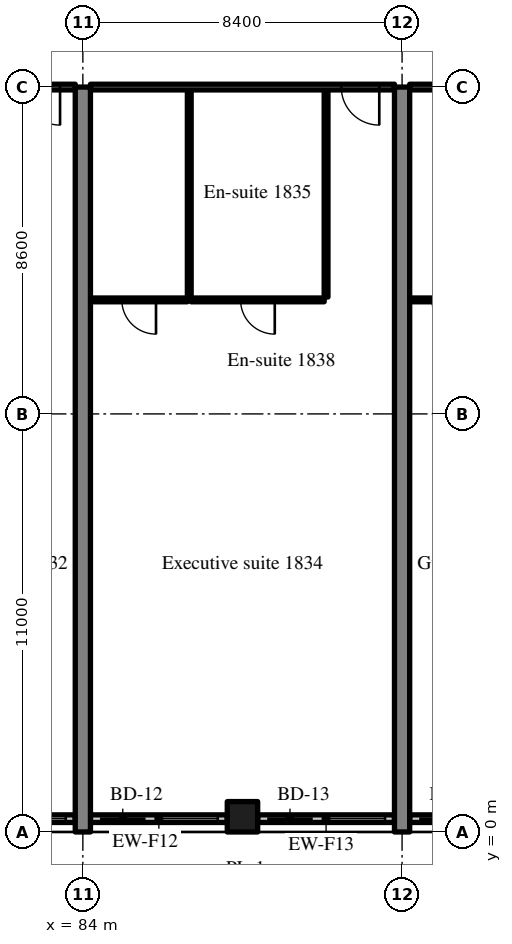
"""IFC4 building model, lengths in metres.
Left out: names, types, materials, properties, quantities, classifications, styles, units other than length and angle.
Written with IfcOpenShell. Run it as: python <this file> out.ifc"""

import sys

from ifc_helpers import new_model, si_unit, direction, frame, frame_2d, origin, origin_2d, place, context, subcontext, project, spatial, rectangle, extrude, source, transform, mapped, element, fill, save


model = new_model("IFC4")
c1 = context("Model", 3, precision=1e-05, world=origin(), true_north=direction((0.0, 1.0)))
c2 = subcontext(c1, "Body", "Model", "MODEL_VIEW")
j1 = project(units=[si_unit("LENGTHUNIT", "METRE"), si_unit("PLANEANGLEUNIT", "RADIAN")], contexts=[c1])
p1 = place(None, origin())
s1 = spatial("IfcSite", under=j1, at=p1, CompositionType="ELEMENT")
p2 = place(p1, origin())
s2 = spatial("IfcBuilding", under=s1, at=p2, CompositionType="ELEMENT")
p3 = place(p2, frame((0.0, 0.0, 77.2)))
s3 = spatial("IfcBuildingStorey", under=s2, at=p3, CompositionType="ELEMENT", Elevation=77.2)
m1 = source(origin(), c2, "Body", "SweptSolid", [
    extrude(rectangle(XDim=19.6, YDim=0.4, at=frame_2d((9.8, 0.0))), origin(), (0.0, 0.0, 1.0), 3.52),
])
for number, where, z_axis, x_axis in (
    (1, (84.0, 0.0, 0.0), (0.0, 0.0, 1.0), (0.0, 1.0, 0.0)),
    (2, (92.4, 0.0, 0.0), (0.0, 0.0, 1.0), (0.0, 1.0, 0.0)),
):
    element("IfcWall", number, at=place(p3, frame(where, z_axis=z_axis, x_axis=x_axis)), inside=s3, PredefinedType="SHEAR", context=c2, shape_type="MappedRepresentation", body=[
        mapped(m1, transform((0.0, 0.0, 0.0), scale=1.0)),
    ])
m2 = source(origin(), c2, "Body", "SweptSolid", [
    extrude(rectangle(XDim=0.8, YDim=0.8, at=origin_2d()), origin(), (0.0, 0.0, 1.0), 3.52),
])
p4 = place(p3, frame((88.2, 0.4, 0.0), z_axis=(0.0, 0.0, 1.0), x_axis=(1.0, 0.0, 0.0)))
e3 = element("IfcColumn", 3, at=p4, inside=s3, PredefinedType="COLUMN", context=c2, shape_type="MappedRepresentation", body=[
    mapped(m2, transform((0.0, 0.0, 0.0), scale=1.0)),
])
m3 = source(origin(), c2, "Body", "SweptSolid", [
    extrude(rectangle(XDim=3.6, YDim=0.2, at=frame_2d((1.8, 0.0))), origin(), (0.0, 0.0, 1.0), 2.82),
])
p5 = place(p3, frame((80.2, 0.35, 0.0), z_axis=(0.0, 0.0, 1.0), x_axis=(1.0, 0.0, 0.0)))
e4 = element("IfcWall", 4, at=p5, inside=s3, PredefinedType="SOLIDWALL", context=c2, shape_type="MappedRepresentation", body=[
    mapped(m3, transform((0.0, 0.0, 0.0), scale=1.0)),
])
m4 = source(origin(), c2, "Body", "SweptSolid", [
    extrude(rectangle(XDim=1.2, YDim=2.4, at=frame_2d((0.6, 1.2))), frame((0.0, 0.11, 0.0), z_axis=(0.0, -1.0, 0.0), x_axis=(1.0, 0.0, 0.0)), (0.0, 0.0, 1.0), 0.22),
])
p6 = place(p5, frame((0.25, 0.0, 0.0)))
e5 = element("IfcOpeningElement", 5, at=p6, cuts=e4, PredefinedType="OPENING", context=c2, shape_type="MappedRepresentation", body=[
    mapped(m4, transform((0.0, 0.0, 0.0), scale=1.0)),
])
m5 = source(origin(), c2, "Body", "SweptSolid", [
    extrude(rectangle(XDim=1.5, YDim=1.5, at=frame_2d((0.75, 0.75))), frame((0.0, 0.11, 0.0), z_axis=(0.0, -1.0, 0.0), x_axis=(1.0, 0.0, 0.0)), (0.0, 0.0, 1.0), 0.22),
])
p7 = place(p5, frame((1.85, 0.0, 0.9)))
e6 = element("IfcOpeningElement", 6, at=p7, cuts=e4, PredefinedType="OPENING", context=c2, shape_type="MappedRepresentation", body=[
    mapped(m5, transform((0.0, 0.0, 0.0), scale=1.0)),
])
p8 = place(p3, frame((84.2, 0.35, 0.0), z_axis=(0.0, 0.0, 1.0), x_axis=(1.0, 0.0, 0.0)))
e7 = element("IfcWall", 7, at=p8, inside=s3, PredefinedType="SOLIDWALL", context=c2, shape_type="MappedRepresentation", body=[
    mapped(m3, transform((0.0, 0.0, 0.0), scale=1.0)),
])
p9 = place(p8, frame((0.25, 0.0, 0.0)))
e8 = element("IfcOpeningElement", 8, at=p9, cuts=e7, PredefinedType="OPENING", context=c2, shape_type="MappedRepresentation", body=[
    mapped(m4, transform((0.0, 0.0, 0.0), scale=1.0)),
])
p10 = place(p8, frame((1.85, 0.0, 0.9)))
e9 = element("IfcOpeningElement", 9, at=p10, cuts=e7, PredefinedType="OPENING", context=c2, shape_type="MappedRepresentation", body=[
    mapped(m5, transform((0.0, 0.0, 0.0), scale=1.0)),
])
m6 = source(origin(), c2, "Body", "SweptSolid", [
    extrude(rectangle(XDim=3.6, YDim=0.2, at=frame_2d((1.8, 0.0))), origin(), (0.0, 0.0, 1.0), 2.82),
])
p11 = place(p3, frame((88.6, 0.35, 0.0), z_axis=(0.0, 0.0, 1.0), x_axis=(1.0, 0.0, 0.0)))
e10 = element("IfcWall", 10, at=p11, inside=s3, PredefinedType="SOLIDWALL", context=c2, shape_type="MappedRepresentation", body=[
    mapped(m6, transform((0.0, 0.0, 0.0), scale=1.0)),
])
p12 = place(p11, frame((0.25, 0.0, 0.0)))
e11 = element("IfcOpeningElement", 11, at=p12, cuts=e10, PredefinedType="OPENING", context=c2, shape_type="MappedRepresentation", body=[
    mapped(m4, transform((0.0, 0.0, 0.0), scale=1.0)),
])
p13 = place(p11, frame((1.85, 0.0, 0.9)))
e12 = element("IfcOpeningElement", 12, at=p13, cuts=e10, PredefinedType="OPENING", context=c2, shape_type="MappedRepresentation", body=[
    mapped(m5, transform((0.0, 0.0, 0.0), scale=1.0)),
])
m7 = source(origin(), c2, "Body", "SweptSolid", [
    extrude(rectangle(XDim=4.055, YDim=0.2, at=frame_2d((2.027, 0.0))), origin(), (0.0, 0.0, 1.0), 2.82),
])
p14 = place(p3, frame((92.6, 0.35, 0.0), z_axis=(0.0, 0.0, 1.0), x_axis=(1.0, 0.0, 0.0)))
e13 = element("IfcWall", 13, at=p14, inside=s3, PredefinedType="SOLIDWALL", context=c2, shape_type="MappedRepresentation", body=[
    mapped(m7, transform((0.0, 0.0, 0.0), scale=1.0)),
])
p15 = place(p14, frame((0.25, 0.0, 0.0)))
e14 = element("IfcOpeningElement", 14, at=p15, cuts=e13, PredefinedType="OPENING", context=c2, shape_type="MappedRepresentation", body=[
    mapped(m4, transform((0.0, 0.0, 0.0), scale=1.0)),
])
p16 = place(p14, frame((2.305, 0.0, 0.9)))
e15 = element("IfcOpeningElement", 15, at=p16, cuts=e13, PredefinedType="OPENING", context=c2, shape_type="MappedRepresentation", body=[
    mapped(m5, transform((0.0, 0.0, 0.0), scale=1.0)),
])
m8 = source(origin(), c2, "Body", "SweptSolid", [
    extrude(rectangle(XDim=3.925, YDim=0.15, at=frame_2d((1.962, 0.0))), origin(), (0.0, 0.0, 1.0), 2.82),
])
p17 = place(p3, frame((79.875, 19.6, 0.0), z_axis=(0.0, 0.0, 1.0), x_axis=(1.0, 0.0, 0.0)))
e16 = element("IfcWall", 16, at=p17, inside=s3, PredefinedType="PARTITIONING", context=c2, shape_type="MappedRepresentation", body=[
    mapped(m8, transform((0.0, 0.0, 0.0), scale=1.0)),
])
m9 = source(origin(), c2, "Body", "SweptSolid", [
    extrude(rectangle(XDim=1.0, YDim=2.1, at=frame_2d((0.5, 1.05))), frame((0.0, 0.085, 0.0), z_axis=(0.0, -1.0, 0.0), x_axis=(1.0, 0.0, 0.0)), (0.0, 0.0, 1.0), 0.17),
])
p18 = place(p17, frame((2.525, 0.0, 0.0)))
e17 = element("IfcOpeningElement", 17, at=p18, cuts=e16, PredefinedType="OPENING", context=c2, shape_type="MappedRepresentation", body=[
    mapped(m9, transform((0.0, 0.0, 0.0), scale=1.0)),
])
m10 = source(origin(), c2, "Body", "SweptSolid", [
    extrude(rectangle(XDim=5.45, YDim=0.1, at=frame_2d((2.725, 0.0))), origin(), (0.0, 0.0, 1.0), 3.52),
])
for number, where, z_axis, x_axis in (
    (18, (90.4, 14.075, 0.0), (0.0, 0.0, 1.0), (0.0, 1.0, 0.0)),
    (19, (86.8, 14.075, 0.0), (0.0, 0.0, 1.0), (0.0, 1.0, 0.0)),
):
    element("IfcWall", number, at=place(p3, frame(where, z_axis=z_axis, x_axis=x_axis)), inside=s3, PredefinedType="PARTITIONING", context=c2, shape_type="MappedRepresentation", body=[
        mapped(m10, transform((0.0, 0.0, 0.0), scale=1.0)),
    ])
m11 = source(origin(), c2, "Body", "SweptSolid", [
    extrude(rectangle(XDim=3.5, YDim=0.1, at=frame_2d((1.75, 0.0))), origin(), (0.0, 0.0, 1.0), 3.52),
])
p19 = place(p3, frame((86.85, 14.0, 0.0), z_axis=(0.0, 0.0, 1.0), x_axis=(1.0, 0.0, 0.0)))
e20 = element("IfcWall", 20, at=p19, inside=s3, PredefinedType="PARTITIONING", context=c2, shape_type="MappedRepresentation", body=[
    mapped(m11, transform((0.0, 0.0, 0.0), scale=1.0)),
])
m12 = source(origin(), c2, "Body", "SweptSolid", [
    extrude(rectangle(XDim=0.9, YDim=2.1, at=frame_2d((0.45, 1.05))), frame((0.0, 0.06, 0.0), z_axis=(0.0, -1.0, 0.0), x_axis=(1.0, 0.0, 0.0)), (0.0, 0.0, 1.0), 0.12),
])
p20 = place(p19, frame((1.3, 0.0, 0.0)))
e21 = element("IfcOpeningElement", 21, at=p20, cuts=e20, PredefinedType="OPENING", context=c2, shape_type="MappedRepresentation", body=[
    mapped(m12, transform((0.0, 0.0, 0.0), scale=1.0)),
])
m13 = source(origin(), c2, "Body", "SweptSolid", [
    extrude(rectangle(XDim=2.55, YDim=0.1, at=frame_2d((1.275, 0.0))), origin(), (0.0, 0.0, 1.0), 3.52),
])
p21 = place(p3, frame((84.2, 14.0, 0.0), z_axis=(0.0, 0.0, 1.0), x_axis=(1.0, 0.0, 0.0)))
e22 = element("IfcWall", 22, at=p21, inside=s3, PredefinedType="PARTITIONING", context=c2, shape_type="MappedRepresentation", body=[
    mapped(m13, transform((0.0, 0.0, 0.0), scale=1.0)),
])
p22 = place(p21, frame((0.825, 0.0, 0.0)))
e23 = element("IfcOpeningElement", 23, at=p22, cuts=e22, PredefinedType="OPENING", context=c2, shape_type="MappedRepresentation", body=[
    mapped(m12, transform((0.0, 0.0, 0.0), scale=1.0)),
])
m14 = source(origin(), c2, "Body", "SweptSolid", [
    extrude(rectangle(XDim=8.0, YDim=0.15, at=frame_2d((4.0, 0.0))), origin(), (0.0, 0.0, 1.0), 2.82),
])
p23 = place(p3, frame((84.2, 19.6, 0.0), z_axis=(0.0, 0.0, 1.0), x_axis=(1.0, 0.0, 0.0)))
e24 = element("IfcWall", 24, at=p23, inside=s3, PredefinedType="PARTITIONING", context=c2, shape_type="MappedRepresentation", body=[
    mapped(m14, transform((0.0, 0.0, 0.0), scale=1.0)),
])
p24 = place(p23, frame((6.6, 0.0, 0.0)))
e25 = element("IfcOpeningElement", 25, at=p24, cuts=e24, PredefinedType="OPENING", context=c2, shape_type="MappedRepresentation", body=[
    mapped(m9, transform((0.0, 0.0, 0.0), scale=1.0)),
])
m15 = source(origin(), c2, "Body", "SweptSolid", [
    extrude(rectangle(XDim=2.075, YDim=0.1, at=frame_2d((1.038, 0.0))), origin(), (0.0, 0.0, 1.0), 3.52),
])
p25 = place(p3, frame((92.6, 14.0, 0.0), z_axis=(0.0, 0.0, 1.0), x_axis=(1.0, 0.0, 0.0)))
e26 = element("IfcWall", 26, at=p25, inside=s3, PredefinedType="PARTITIONING", context=c2, shape_type="MappedRepresentation", body=[
    mapped(m15, transform((0.0, 0.0, 0.0), scale=1.0)),
])
p26 = place(p25, frame((0.587, 0.0, 0.0)))
e27 = element("IfcOpeningElement", 27, at=p26, cuts=e26, PredefinedType="OPENING", context=c2, shape_type="MappedRepresentation", body=[
    mapped(m12, transform((0.0, 0.0, 0.0), scale=1.0)),
])
m16 = source(origin(), c2, "Body", "SweptSolid", [
    extrude(rectangle(XDim=3.925, YDim=0.15, at=frame_2d((1.962, 0.0))), origin(), (0.0, 0.0, 1.0), 2.82),
])
p27 = place(p3, frame((92.6, 19.6, 0.0), z_axis=(0.0, 0.0, 1.0), x_axis=(1.0, 0.0, 0.0)))
e28 = element("IfcWall", 28, at=p27, inside=s3, PredefinedType="PARTITIONING", context=c2, shape_type="MappedRepresentation", body=[
    mapped(m16, transform((0.0, 0.0, 0.0), scale=1.0)),
])
p28 = place(p27, frame((2.525, 0.0, 0.0)))
e29 = element("IfcOpeningElement", 29, at=p28, cuts=e28, PredefinedType="OPENING", context=c2, shape_type="MappedRepresentation", body=[
    mapped(m9, transform((0.0, 0.0, 0.0), scale=1.0)),
])
m17 = source(origin(), c2, "Body", "SweptSolid", [
    extrude(rectangle(XDim=1.5, YDim=1.5, at=frame_2d((0.75, 0.75))), frame((0.0, 0.03, 0.0), z_axis=(0.0, -1.0, 0.0), x_axis=(1.0, 0.0, 0.0)), (0.0, 0.0, 1.0), 0.06),
])
p29 = place(p7, origin())
e30 = element("IfcWindow", 30, at=p29, inside=s3, PartitioningType="SINGLE_PANEL", PredefinedType="WINDOW", context=c2, shape_type="MappedRepresentation", body=[
    mapped(m17, transform((0.0, 0.0, 0.0), scale=1.0)),
])
fill(e6, e30)
m18 = source(origin(), c2, "Body", "SweptSolid", [
    extrude(rectangle(XDim=1.2, YDim=2.4, at=frame_2d((0.6, 1.2))), frame((0.0, 0.025, 0.0), z_axis=(0.0, -1.0, 0.0), x_axis=(1.0, 0.0, 0.0)), (0.0, 0.0, 1.0), 0.05),
])
p30 = place(p9, origin())
e31 = element("IfcDoor", 31, at=p30, inside=s3, OperationType="SLIDING_TO_RIGHT", PredefinedType="DOOR", context=c2, shape_type="MappedRepresentation", body=[
    mapped(m18, transform((0.0, 0.0, 0.0), scale=1.0)),
])
fill(e8, e31)
p31 = place(p10, origin())
e32 = element("IfcWindow", 32, at=p31, inside=s3, PartitioningType="SINGLE_PANEL", PredefinedType="WINDOW", context=c2, shape_type="MappedRepresentation", body=[
    mapped(m17, transform((0.0, 0.0, 0.0), scale=1.0)),
])
fill(e9, e32)
p32 = place(p12, origin())
e33 = element("IfcDoor", 33, at=p32, inside=s3, OperationType="SLIDING_TO_LEFT", PredefinedType="DOOR", context=c2, shape_type="MappedRepresentation", body=[
    mapped(m18, transform((0.0, 0.0, 0.0), scale=1.0)),
])
fill(e11, e33)
p33 = place(p13, origin())
e34 = element("IfcWindow", 34, at=p33, inside=s3, PartitioningType="SINGLE_PANEL", PredefinedType="WINDOW", context=c2, shape_type="MappedRepresentation", body=[
    mapped(m17, transform((0.0, 0.0, 0.0), scale=1.0)),
])
fill(e12, e34)
p34 = place(p15, origin())
e35 = element("IfcDoor", 35, at=p34, inside=s3, OperationType="SLIDING_TO_RIGHT", PredefinedType="DOOR", context=c2, shape_type="MappedRepresentation", body=[
    mapped(m18, transform((0.0, 0.0, 0.0), scale=1.0)),
])
fill(e14, e35)
m19 = source(origin(), c2, "Body", "SweptSolid", [
    extrude(rectangle(XDim=1.0, YDim=2.1, at=frame_2d((0.5, 1.05))), frame((0.0, 0.025, 0.0), z_axis=(0.0, -1.0, 0.0), x_axis=(1.0, 0.0, 0.0)), (0.0, 0.0, 1.0), 0.05),
])
p35 = place(p18, origin())
e36 = element("IfcDoor", 36, at=p35, inside=s3, OperationType="SINGLE_SWING_RIGHT", PredefinedType="DOOR", context=c2, shape_type="MappedRepresentation", body=[
    mapped(m19, transform((0.0, 0.0, 0.0), scale=1.0)),
])
fill(e17, e36)
m20 = source(origin(), c2, "Body", "SweptSolid", [
    extrude(rectangle(XDim=0.9, YDim=2.1, at=frame_2d((0.45, 1.05))), frame((0.0, 0.025, 0.0), z_axis=(0.0, -1.0, 0.0), x_axis=(1.0, 0.0, 0.0)), (0.0, 0.0, 1.0), 0.05),
])
p36 = place(p20, origin())
e37 = element("IfcDoor", 37, at=p36, inside=s3, OperationType="SINGLE_SWING_RIGHT", PredefinedType="DOOR", context=c2, shape_type="MappedRepresentation", body=[
    mapped(m20, transform((0.0, 0.0, 0.0), scale=1.0)),
])
fill(e21, e37)
p37 = place(p22, origin())
e38 = element("IfcDoor", 38, at=p37, inside=s3, OperationType="SINGLE_SWING_RIGHT", PredefinedType="DOOR", context=c2, shape_type="MappedRepresentation", body=[
    mapped(m20, transform((0.0, 0.0, 0.0), scale=1.0)),
])
fill(e23, e38)
p38 = place(p24, origin())
e39 = element("IfcDoor", 39, at=p38, inside=s3, OperationType="SINGLE_SWING_RIGHT", PredefinedType="DOOR", context=c2, shape_type="MappedRepresentation", body=[
    mapped(m19, transform((0.0, 0.0, 0.0), scale=1.0)),
])
fill(e25, e39)
p39 = place(p26, origin())
e40 = element("IfcDoor", 40, at=p39, inside=s3, OperationType="SINGLE_SWING_RIGHT", PredefinedType="DOOR", context=c2, shape_type="MappedRepresentation", body=[
    mapped(m20, transform((0.0, 0.0, 0.0), scale=1.0)),
])
fill(e27, e40)
save(model, sys.argv[1])
